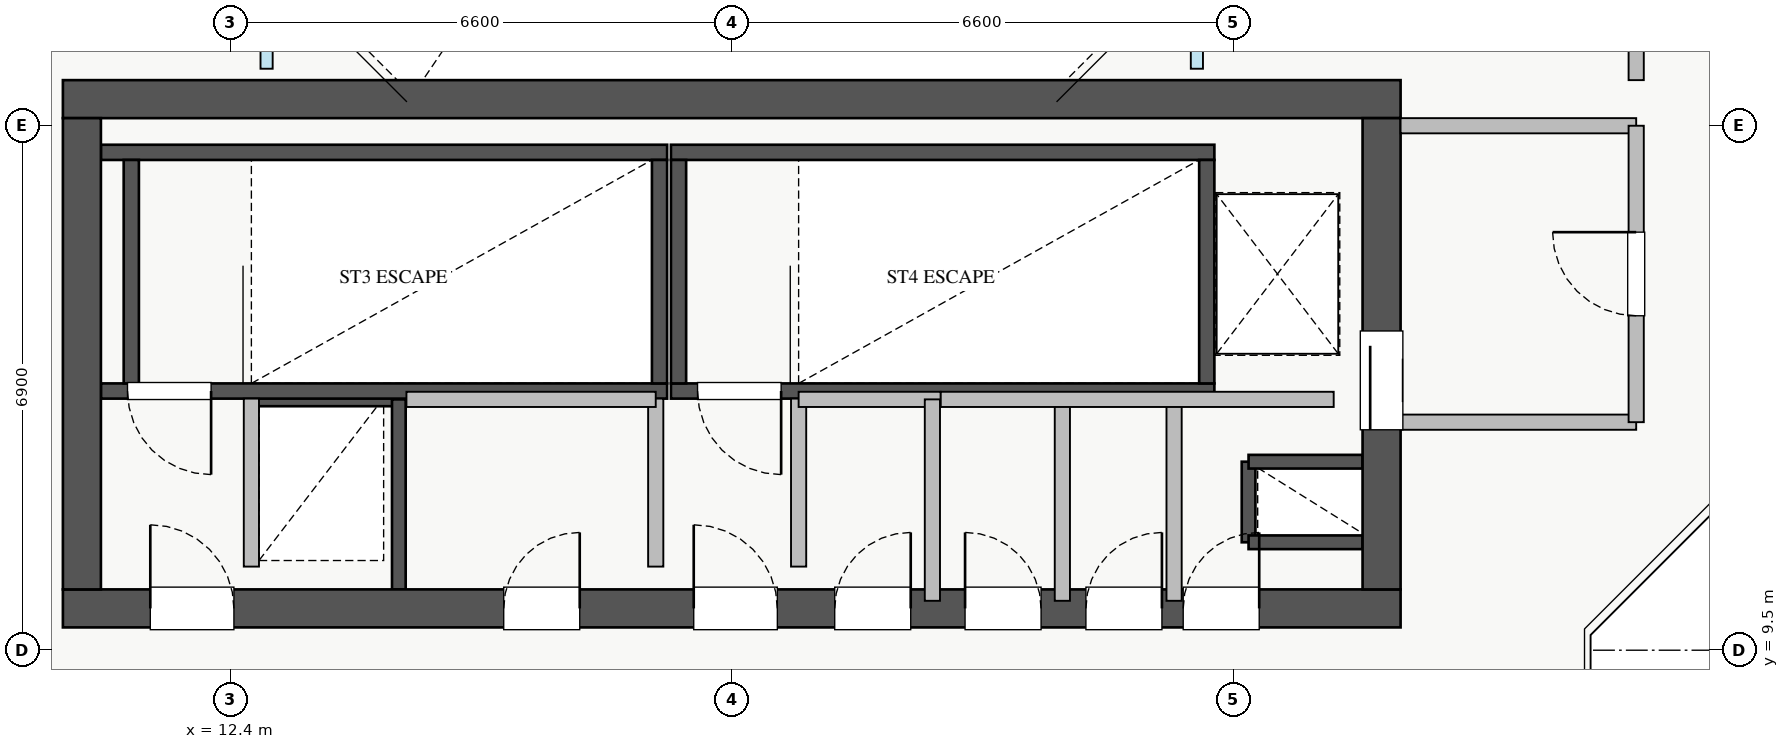
"""IFC4 building model, lengths in metres.
Left out: names, types, materials, properties, quantities, classifications, styles, units other than length and angle.
Written with IfcOpenShell. Run it as: python <this file> out.ifc"""

import sys

from ifc_helpers import new_model, si_unit, direction, frame, frame_2d, origin, place, context, subcontext, project, spatial, rectangle, extrude, source, transform, mapped, element, fill, save


model = new_model("IFC4")
c1 = context("Model", 3, precision=1e-05, world=origin(), true_north=direction((0.0, 1.0)))
c2 = subcontext(c1, "Body", "Model", "MODEL_VIEW")
j1 = project(units=[si_unit("LENGTHUNIT", "METRE"), si_unit("PLANEANGLEUNIT", "RADIAN")], contexts=[c1])
p1 = place(None, origin())
s1 = spatial("IfcSite", under=j1, at=p1, CompositionType="ELEMENT")
p2 = place(p1, origin())
s2 = spatial("IfcBuilding", under=s1, at=p2, CompositionType="ELEMENT")
p3 = place(p2, frame((0.0, 0.0, 263.25)))
s3 = spatial("IfcBuildingStorey", under=s2, at=p3, CompositionType="ELEMENT", Elevation=263.25)
p4 = place(p3, frame((12.68, 12.8, 0.0), z_axis=(0.0, 0.0, 1.0), x_axis=(1.0, 0.0, 0.0)))
e1 = element("IfcWall", 1, at=p4, inside=s3, PredefinedType="SHEAR", context=c2, shape_type="SweptSolid", body=[
    extrude(rectangle(XDim=1.94, YDim=0.18, at=frame_2d((0.97, 0.0))), origin(), (0.0, 0.0, 1.0), 4.25),
])
p5 = place(p3, frame((14.62, 10.3, 0.0), z_axis=(0.0, 0.0, 1.0), x_axis=(0.0, 1.0, 0.0)))
e2 = element("IfcWall", 2, at=p5, inside=s3, PredefinedType="SHEAR", context=c2, shape_type="SweptSolid", body=[
    extrude(rectangle(XDim=2.5, YDim=0.18, at=frame_2d((1.25, 0.0))), origin(), (0.0, 0.0, 1.0), 4.25),
])
p6 = place(p3, frame((25.8, 10.92, 0.0), z_axis=(0.0, 0.0, 1.0), x_axis=(0.0, 1.0, 0.0)))
e3 = element("IfcWall", 3, at=p6, inside=s3, PredefinedType="SHEAR", context=c2, shape_type="SweptSolid", body=[
    extrude(rectangle(XDim=1.06, YDim=0.18, at=frame_2d((0.53, 0.0))), origin(), (0.0, 0.0, 1.0), 4.25),
])
for number, where, z_axis, x_axis in (
    (4, (25.8, 11.98, 0.0), (0.0, 0.0, 1.0), (1.0, 0.0, 0.0)),
    (5, (25.8, 10.92, 0.0), (0.0, 0.0, 1.0), (1.0, 0.0, 0.0)),
):
    element("IfcWall", number, at=place(p3, frame(where, z_axis=z_axis, x_axis=x_axis)), inside=s3, PredefinedType="SHEAR", context=c2, shape_type="SweptSolid", body=[
        extrude(rectangle(XDim=1.5, YDim=0.18, at=frame_2d((0.75, 0.0))), origin(), (0.0, 0.0, 1.0), 4.25),
    ])
p7 = place(p3, frame((10.7, 12.91, 0.0), z_axis=(0.0, 0.0, 1.0), x_axis=(1.0, 0.0, 0.0)))
e6 = element("IfcWall", 6, at=p7, inside=s3, PredefinedType="SHEAR", context=c2, shape_type="SweptSolid", body=[
    extrude(rectangle(XDim=7.45, YDim=0.2, at=frame_2d((3.725, 0.0))), origin(), (0.0, 0.0, 1.0), 4.5),
])
p8 = place(p7, frame((0.35, 0.0, 0.0)))
e7 = element("IfcOpeningElement", 7, at=p8, cuts=e6, PredefinedType="OPENING", context=c2, shape_type="SweptSolid", body=[
    extrude(rectangle(XDim=1.1, YDim=2.05, at=frame_2d((0.55, 1.025))), frame((0.0, 0.11, 0.0), z_axis=(0.0, -1.0, 0.0), x_axis=(1.0, 0.0, 0.0)), (0.0, 0.0, 1.0), 0.22),
])
p9 = place(p3, frame((10.7, 16.05, 0.0), z_axis=(0.0, 0.0, 1.0), x_axis=(1.0, 0.0, 0.0)))
e8 = element("IfcWall", 8, at=p9, inside=s3, PredefinedType="SHEAR", context=c2, shape_type="SweptSolid", body=[
    extrude(rectangle(XDim=7.45, YDim=0.2, at=frame_2d((3.725, 0.0))), origin(), (0.0, 0.0, 1.0), 4.5),
])
for number, where, z_axis, x_axis in (
    (9, (11.1, 13.01, 0.0), (0.0, 0.0, 1.0), (0.0, 1.0, 0.0)),
    (10, (18.05, 13.01, 0.0), (0.0, 0.0, 1.0), (0.0, 1.0, 0.0)),
):
    element("IfcWall", number, at=place(p3, frame(where, z_axis=z_axis, x_axis=x_axis)), inside=s3, PredefinedType="SHEAR", context=c2, shape_type="SweptSolid", body=[
        extrude(rectangle(XDim=2.94, YDim=0.2, at=frame_2d((1.47, 0.0))), origin(), (0.0, 0.0, 1.0), 4.5),
    ])
p10 = place(p3, frame((18.2, 12.91, 0.0), z_axis=(0.0, 0.0, 1.0), x_axis=(1.0, 0.0, 0.0)))
e11 = element("IfcWall", 11, at=p10, inside=s3, PredefinedType="SHEAR", context=c2, shape_type="SweptSolid", body=[
    extrude(rectangle(XDim=7.15, YDim=0.2, at=frame_2d((3.575, 0.0))), origin(), (0.0, 0.0, 1.0), 4.5),
])
p11 = place(p10, frame((0.35, 0.0, 0.0)))
e12 = element("IfcOpeningElement", 12, at=p11, cuts=e11, PredefinedType="OPENING", context=c2, shape_type="SweptSolid", body=[
    extrude(rectangle(XDim=1.1, YDim=2.05, at=frame_2d((0.55, 1.025))), frame((0.0, 0.11, 0.0), z_axis=(0.0, -1.0, 0.0), x_axis=(1.0, 0.0, 0.0)), (0.0, 0.0, 1.0), 0.22),
])
p12 = place(p3, frame((18.2, 16.05, 0.0), z_axis=(0.0, 0.0, 1.0), x_axis=(1.0, 0.0, 0.0)))
e13 = element("IfcWall", 13, at=p12, inside=s3, PredefinedType="SHEAR", context=c2, shape_type="SweptSolid", body=[
    extrude(rectangle(XDim=7.15, YDim=0.2, at=frame_2d((3.575, 0.0))), origin(), (0.0, 0.0, 1.0), 4.5),
])
for number, where, z_axis, x_axis in (
    (14, (18.3, 13.01, 0.0), (0.0, 0.0, 1.0), (0.0, 1.0, 0.0)),
    (15, (25.25, 13.01, 0.0), (0.0, 0.0, 1.0), (0.0, 1.0, 0.0)),
):
    element("IfcWall", number, at=place(p3, frame(where, z_axis=z_axis, x_axis=x_axis)), inside=s3, PredefinedType="SHEAR", context=c2, shape_type="SweptSolid", body=[
        extrude(rectangle(XDim=2.94, YDim=0.2, at=frame_2d((1.47, 0.0))), origin(), (0.0, 0.0, 1.0), 4.5),
    ])
p13 = place(p3, frame((10.2, 10.05, 0.0), z_axis=(0.0, 0.0, 1.0), x_axis=(1.0, 0.0, 0.0)))
e16 = element("IfcWall", 16, at=p13, inside=s3, PredefinedType="SHEAR", context=c2, shape_type="SweptSolid", body=[
    extrude(rectangle(XDim=17.6, YDim=0.5, at=frame_2d((8.8, 0.0))), origin(), (0.0, 0.0, 1.0), 4.5),
])
p14 = place(p13, frame((1.15, 0.0, 0.0)))
e17 = element("IfcOpeningElement", 17, at=p14, cuts=e16, PredefinedType="OPENING", context=c2, shape_type="SweptSolid", body=[
    extrude(rectangle(XDim=1.1, YDim=2.05, at=frame_2d((0.55, 1.025))), frame((0.0, 0.26, 0.0), z_axis=(0.0, -1.0, 0.0), x_axis=(1.0, 0.0, 0.0)), (0.0, 0.0, 1.0), 0.52),
])
p15 = place(p13, frame((8.3, 0.0, 0.0)))
e18 = element("IfcOpeningElement", 18, at=p15, cuts=e16, PredefinedType="OPENING", context=c2, shape_type="SweptSolid", body=[
    extrude(rectangle(XDim=1.1, YDim=2.05, at=frame_2d((0.55, 1.025))), frame((0.0, 0.26, 0.0), z_axis=(0.0, -1.0, 0.0), x_axis=(1.0, 0.0, 0.0)), (0.0, 0.0, 1.0), 0.52),
])
p16 = place(p13, frame((5.8, 0.0, 0.0)))
e19 = element("IfcOpeningElement", 19, at=p16, cuts=e16, PredefinedType="OPENING", context=c2, shape_type="SweptSolid", body=[
    extrude(rectangle(XDim=1.0, YDim=2.05, at=frame_2d((0.5, 1.025))), frame((0.0, 0.26, 0.0), z_axis=(0.0, -1.0, 0.0), x_axis=(1.0, 0.0, 0.0)), (0.0, 0.0, 1.0), 0.52),
])
p17 = place(p13, frame((14.74, 0.0, 0.0)))
e20 = element("IfcOpeningElement", 20, at=p17, cuts=e16, PredefinedType="OPENING", context=c2, shape_type="SweptSolid", body=[
    extrude(rectangle(XDim=1.0, YDim=2.05, at=frame_2d((0.5, 1.025))), frame((0.0, 0.26, 0.0), z_axis=(0.0, -1.0, 0.0), x_axis=(1.0, 0.0, 0.0)), (0.0, 0.0, 1.0), 0.52),
])
p18 = place(p13, frame((10.155, 0.0, 0.0)))
e21 = element("IfcOpeningElement", 21, at=p18, cuts=e16, PredefinedType="OPENING", context=c2, shape_type="SweptSolid", body=[
    extrude(rectangle(XDim=1.0, YDim=2.05, at=frame_2d((0.5, 1.025))), frame((0.0, 0.26, 0.0), z_axis=(0.0, -1.0, 0.0), x_axis=(1.0, 0.0, 0.0)), (0.0, 0.0, 1.0), 0.52),
])
p19 = place(p13, frame((11.87, 0.0, 0.0)))
e22 = element("IfcOpeningElement", 22, at=p19, cuts=e16, PredefinedType="OPENING", context=c2, shape_type="SweptSolid", body=[
    extrude(rectangle(XDim=1.0, YDim=2.05, at=frame_2d((0.5, 1.025))), frame((0.0, 0.26, 0.0), z_axis=(0.0, -1.0, 0.0), x_axis=(1.0, 0.0, 0.0)), (0.0, 0.0, 1.0), 0.52),
])
p20 = place(p13, frame((13.46, 0.0, 0.0)))
e23 = element("IfcOpeningElement", 23, at=p20, cuts=e16, PredefinedType="OPENING", context=c2, shape_type="SweptSolid", body=[
    extrude(rectangle(XDim=1.0, YDim=2.05, at=frame_2d((0.5, 1.025))), frame((0.0, 0.26, 0.0), z_axis=(0.0, -1.0, 0.0), x_axis=(1.0, 0.0, 0.0)), (0.0, 0.0, 1.0), 0.52),
])
p21 = place(p3, frame((10.2, 16.75, 0.0), z_axis=(0.0, 0.0, 1.0), x_axis=(1.0, 0.0, 0.0)))
e24 = element("IfcWall", 24, at=p21, inside=s3, PredefinedType="SHEAR", context=c2, shape_type="SweptSolid", body=[
    extrude(rectangle(XDim=17.6, YDim=0.5, at=frame_2d((8.8, 0.0))), origin(), (0.0, 0.0, 1.0), 4.5),
])
p22 = place(p3, frame((10.45, 10.3, 0.0), z_axis=(0.0, 0.0, 1.0), x_axis=(0.0, 1.0, 0.0)))
e25 = element("IfcWall", 25, at=p22, inside=s3, PredefinedType="SHEAR", context=c2, shape_type="SweptSolid", body=[
    extrude(rectangle(XDim=6.2, YDim=0.5, at=frame_2d((3.1, 0.0))), origin(), (0.0, 0.0, 1.0), 4.5),
])
p23 = place(p3, frame((27.55, 10.3, 0.0), z_axis=(0.0, 0.0, 1.0), x_axis=(0.0, 1.0, 0.0)))
e26 = element("IfcWall", 26, at=p23, inside=s3, PredefinedType="SHEAR", context=c2, shape_type="SweptSolid", body=[
    extrude(rectangle(XDim=6.2, YDim=0.5, at=frame_2d((3.1, 0.0))), origin(), (0.0, 0.0, 1.0), 4.5),
])
p24 = place(p23, frame((2.1, 0.0, 0.0)))
e27 = element("IfcOpeningElement", 27, at=p24, cuts=e26, PredefinedType="OPENING", context=c2, shape_type="SweptSolid", body=[
    extrude(rectangle(XDim=1.3, YDim=2.05, at=frame_2d((0.65, 1.025))), frame((0.0, 0.26, 0.0), z_axis=(0.0, -1.0, 0.0), x_axis=(1.0, 0.0, 0.0)), (0.0, 0.0, 1.0), 0.52),
])
for number, where, z_axis, x_axis in (
    (28, (27.8, 16.4, 0.0), (0.0, 0.0, 1.0), (1.0, 0.0, 0.0)),
    (29, (27.8, 12.5, 0.0), (0.0, 0.0, 1.0), (1.0, 0.0, 0.0)),
):
    element("IfcWall", number, at=place(p3, frame(where, z_axis=z_axis, x_axis=x_axis)), inside=s3, PredefinedType="PARTITIONING", context=c2, shape_type="SweptSolid", body=[
        extrude(rectangle(XDim=3.1, YDim=0.2, at=frame_2d((1.55, 0.0))), origin(), (0.0, 0.0, 1.0), 4.25),
    ])
p25 = place(p3, frame((30.9, 12.5, 0.0), z_axis=(0.0, 0.0, 1.0), x_axis=(0.0, 1.0, 0.0)))
e30 = element("IfcWall", 30, at=p25, inside=s3, PredefinedType="PARTITIONING", context=c2, shape_type="SweptSolid", body=[
    extrude(rectangle(XDim=3.9, YDim=0.2, at=frame_2d((1.95, 0.0))), origin(), (0.0, 0.0, 1.0), 4.045),
])
p26 = place(p25, frame((1.4, 0.0, 0.0)))
e31 = element("IfcOpeningElement", 31, at=p26, cuts=e30, PredefinedType="OPENING", context=c2, shape_type="SweptSolid", body=[
    extrude(rectangle(XDim=1.1, YDim=2.05, at=frame_2d((0.55, 1.025))), frame((0.0, 0.11, 0.0), z_axis=(0.0, -1.0, 0.0), x_axis=(1.0, 0.0, 0.0)), (0.0, 0.0, 1.0), 0.22),
])
for number, where, z_axis, x_axis in (
    (32, (12.68, 10.6, 0.0), (0.0, 0.0, 1.0), (0.0, 1.0, 0.0)),
    (33, (18.0, 10.6, 0.0), (0.0, 0.0, 1.0), (0.0, 1.0, 0.0)),
    (34, (19.88, 10.6, 0.0), (0.0, 0.0, 1.0), (0.0, 1.0, 0.0)),
):
    element("IfcWall", number, at=place(p3, frame(where, z_axis=z_axis, x_axis=x_axis)), inside=s3, PredefinedType="PARTITIONING", context=c2, shape_type="SweptSolid", body=[
        extrude(rectangle(XDim=2.21, YDim=0.2, at=frame_2d((1.105, 0.0))), origin(), (0.0, 0.0, 1.0), 4.25),
    ])
p27 = place(p3, frame((14.72, 12.8, 0.0), z_axis=(0.0, 0.0, 1.0), x_axis=(1.0, 0.0, 0.0)))
e35 = element("IfcWall", 35, at=p27, inside=s3, PredefinedType="PARTITIONING", context=c2, shape_type="SweptSolid", body=[
    extrude(rectangle(XDim=3.28, YDim=0.2, at=frame_2d((1.64, 0.0))), origin(), (0.0, 0.0, 1.0), 4.25),
])
p28 = place(p3, frame((24.82, 10.15, 0.0), z_axis=(0.0, 0.0, 1.0), x_axis=(0.0, 1.0, 0.0)))
e36 = element("IfcWall", 36, at=p28, inside=s3, PredefinedType="PARTITIONING", context=c2, shape_type="SweptSolid", body=[
    extrude(rectangle(XDim=2.65, YDim=0.2, at=frame_2d((1.325, 0.0))), origin(), (0.0, 0.0, 1.0), 4.25),
])
p29 = place(p3, frame((19.88, 12.8, 0.0), z_axis=(0.0, 0.0, 1.0), x_axis=(1.0, 0.0, 0.0)))
e37 = element("IfcWall", 37, at=p29, inside=s3, PredefinedType="PARTITIONING", context=c2, shape_type="SweptSolid", body=[
    extrude(rectangle(XDim=1.87, YDim=0.2, at=frame_2d((0.935, 0.0))), origin(), (0.0, 0.0, 1.0), 4.25),
])
for number, where, z_axis, x_axis in (
    (38, (21.64, 10.15, 0.0), (0.0, 0.0, 1.0), (0.0, 1.0, 0.0)),
    (39, (23.35, 10.15, 0.0), (0.0, 0.0, 1.0), (0.0, 1.0, 0.0)),
):
    element("IfcWall", number, at=place(p3, frame(where, z_axis=z_axis, x_axis=x_axis)), inside=s3, PredefinedType="PARTITIONING", context=c2, shape_type="SweptSolid", body=[
        extrude(rectangle(XDim=2.65, YDim=0.2, at=frame_2d((1.325, 0.0))), origin(), (0.0, 0.0, 1.0), 4.25),
    ])
p30 = place(p3, frame((21.75, 12.8, 0.0), z_axis=(0.0, 0.0, 1.0), x_axis=(1.0, 0.0, 0.0)))
e40 = element("IfcWall", 40, at=p30, inside=s3, PredefinedType="PARTITIONING", context=c2, shape_type="SweptSolid", body=[
    extrude(rectangle(XDim=5.17, YDim=0.2, at=frame_2d((2.585, 0.0))), origin(), (0.0, 0.0, 1.0), 4.25),
])
p31 = place(p3, frame((30.9, 17.0, 0.0), z_axis=(0.0, 0.0, 1.0), x_axis=(0.0, 1.0, 0.0)))
e41 = element("IfcWall", 41, at=p31, inside=s3, PredefinedType="PARTITIONING", context=c2, shape_type="SweptSolid", body=[
    extrude(rectangle(XDim=12.0, YDim=0.2, at=frame_2d((6.0, 0.0))), origin(), (0.0, 0.0, 1.0), 4.045),
])
p32 = place(p31, frame((5.5, 0.0, 0.0)))
e42 = element("IfcOpeningElement", 42, at=p32, cuts=e41, PredefinedType="OPENING", context=c2, shape_type="SweptSolid", body=[
    extrude(rectangle(XDim=1.0, YDim=2.05, at=frame_2d((0.5, 1.025))), frame((0.0, 0.11, 0.0), z_axis=(0.0, -1.0, 0.0), x_axis=(1.0, 0.0, 0.0)), (0.0, 0.0, 1.0), 0.22),
])
m1 = source(origin(), c2, "Body", "SweptSolid", [
    extrude(rectangle(XDim=1.3, YDim=2.05, at=frame_2d((0.65, 1.025))), frame((0.0, 0.025, 0.0), z_axis=(0.0, -1.0, 0.0), x_axis=(1.0, 0.0, 0.0)), (0.0, 0.0, 1.0), 0.05),
])
p33 = place(p24, origin())
e43 = element("IfcDoor", 43, at=p33, inside=s3, OperationType="SLIDING_TO_RIGHT", PredefinedType="DOOR", context=c2, shape_type="MappedRepresentation", body=[
    mapped(m1, transform((0.0, 0.0, 0.0), x_axis=(1.0, 0.0, 0.0), y_axis=(0.0, 1.0, 0.0), z_axis=(0.0, 0.0, 1.0), scale=1.0)),
])
fill(e27, e43)
m2 = source(origin(), c2, "Body", "SweptSolid", [
    extrude(rectangle(XDim=1.1, YDim=2.05, at=frame_2d((0.55, 1.025))), frame((0.0, 0.025, 0.0), z_axis=(0.0, -1.0, 0.0), x_axis=(1.0, 0.0, 0.0)), (0.0, 0.0, 1.0), 0.05),
])
p34 = place(p14, origin())
e44 = element("IfcDoor", 44, at=p34, inside=s3, OperationType="SINGLE_SWING_LEFT", PredefinedType="DOOR", context=c2, shape_type="MappedRepresentation", body=[
    mapped(m2, transform((0.0, 0.0, 0.0), x_axis=(1.0, 0.0, 0.0), y_axis=(0.0, 1.0, 0.0), z_axis=(0.0, 0.0, 1.0), scale=1.0)),
])
fill(e17, e44)
p35 = place(p8, frame((1.1, 0.0, 0.0), z_axis=(0.0, 0.0, 1.0), x_axis=(-1.0, 0.0, 0.0)))
e45 = element("IfcDoor", 45, at=p35, inside=s3, OperationType="SINGLE_SWING_RIGHT", PredefinedType="DOOR", context=c2, shape_type="MappedRepresentation", body=[
    mapped(m2, transform((0.0, 0.0, 0.0), x_axis=(1.0, 0.0, 0.0), y_axis=(0.0, 1.0, 0.0), z_axis=(0.0, 0.0, 1.0), scale=1.0)),
])
fill(e7, e45)
p36 = place(p15, origin())
e46 = element("IfcDoor", 46, at=p36, inside=s3, OperationType="SINGLE_SWING_LEFT", PredefinedType="DOOR", context=c2, shape_type="MappedRepresentation", body=[
    mapped(m2, transform((0.0, 0.0, 0.0), x_axis=(1.0, 0.0, 0.0), y_axis=(0.0, 1.0, 0.0), z_axis=(0.0, 0.0, 1.0), scale=1.0)),
])
fill(e18, e46)
p37 = place(p11, frame((1.1, 0.0, 0.0), z_axis=(0.0, 0.0, 1.0), x_axis=(-1.0, 0.0, 0.0)))
e47 = element("IfcDoor", 47, at=p37, inside=s3, OperationType="SINGLE_SWING_RIGHT", PredefinedType="DOOR", context=c2, shape_type="MappedRepresentation", body=[
    mapped(m2, transform((0.0, 0.0, 0.0), x_axis=(1.0, 0.0, 0.0), y_axis=(0.0, 1.0, 0.0), z_axis=(0.0, 0.0, 1.0), scale=1.0)),
])
fill(e12, e47)
m3 = source(origin(), c2, "Body", "SweptSolid", [
    extrude(rectangle(XDim=1.0, YDim=2.05, at=frame_2d((0.5, 1.025))), frame((0.0, 0.025, 0.0), z_axis=(0.0, -1.0, 0.0), x_axis=(1.0, 0.0, 0.0)), (0.0, 0.0, 1.0), 0.05),
])
p38 = place(p16, origin())
e48 = element("IfcDoor", 48, at=p38, inside=s3, OperationType="SINGLE_SWING_RIGHT", PredefinedType="DOOR", context=c2, shape_type="MappedRepresentation", body=[
    mapped(m3, transform((0.0, 0.0, 0.0), x_axis=(1.0, 0.0, 0.0), y_axis=(0.0, 1.0, 0.0), z_axis=(0.0, 0.0, 1.0), scale=1.0)),
])
fill(e19, e48)
p39 = place(p17, origin())
e49 = element("IfcDoor", 49, at=p39, inside=s3, OperationType="SINGLE_SWING_RIGHT", PredefinedType="DOOR", context=c2, shape_type="MappedRepresentation", body=[
    mapped(m3, transform((0.0, 0.0, 0.0), x_axis=(1.0, 0.0, 0.0), y_axis=(0.0, 1.0, 0.0), z_axis=(0.0, 0.0, 1.0), scale=1.0)),
])
fill(e20, e49)
p40 = place(p18, origin())
e50 = element("IfcDoor", 50, at=p40, inside=s3, OperationType="SINGLE_SWING_RIGHT", PredefinedType="DOOR", context=c2, shape_type="MappedRepresentation", body=[
    mapped(m3, transform((0.0, 0.0, 0.0), x_axis=(1.0, 0.0, 0.0), y_axis=(0.0, 1.0, 0.0), z_axis=(0.0, 0.0, 1.0), scale=1.0)),
])
fill(e21, e50)
p41 = place(p19, origin())
e51 = element("IfcDoor", 51, at=p41, inside=s3, OperationType="SINGLE_SWING_LEFT", PredefinedType="DOOR", context=c2, shape_type="MappedRepresentation", body=[
    mapped(m3, transform((0.0, 0.0, 0.0), x_axis=(1.0, 0.0, 0.0), y_axis=(0.0, 1.0, 0.0), z_axis=(0.0, 0.0, 1.0), scale=1.0)),
])
fill(e22, e51)
p42 = place(p20, origin())
e52 = element("IfcDoor", 52, at=p42, inside=s3, OperationType="SINGLE_SWING_RIGHT", PredefinedType="DOOR", context=c2, shape_type="MappedRepresentation", body=[
    mapped(m3, transform((0.0, 0.0, 0.0), x_axis=(1.0, 0.0, 0.0), y_axis=(0.0, 1.0, 0.0), z_axis=(0.0, 0.0, 1.0), scale=1.0)),
])
fill(e23, e52)
p43 = place(p26, origin())
e53 = element("IfcDoor", 53, at=p43, inside=s3, OperationType="SINGLE_SWING_RIGHT", PredefinedType="DOOR", context=c2, shape_type="MappedRepresentation", body=[
    mapped(m2, transform((0.0, 0.0, 0.0), x_axis=(1.0, 0.0, 0.0), y_axis=(0.0, 1.0, 0.0), z_axis=(0.0, 0.0, 1.0), scale=1.0)),
])
fill(e31, e53)
save(model, sys.argv[1])
